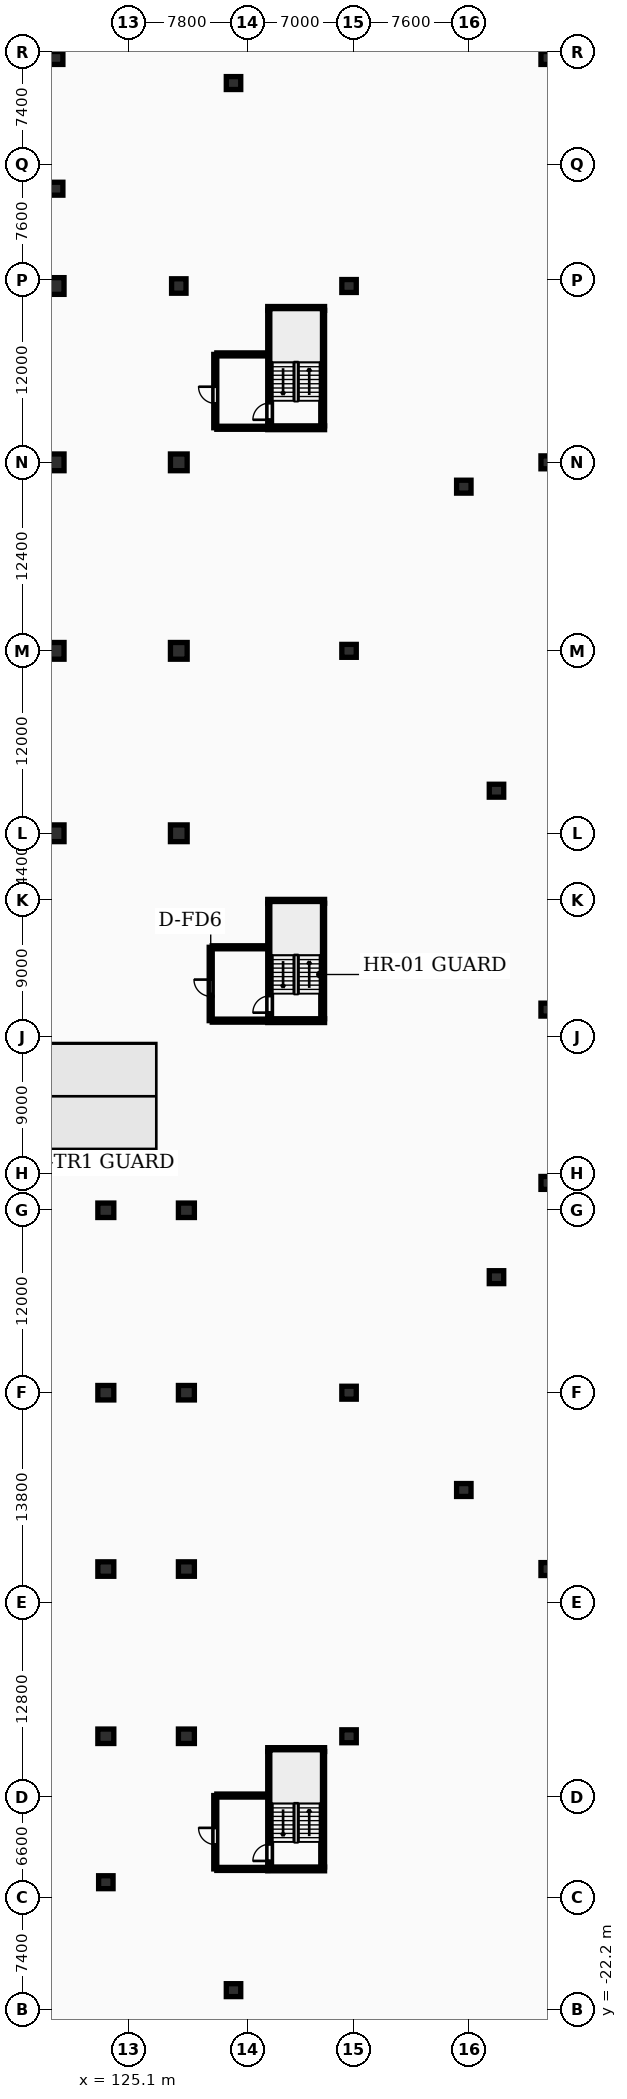
"""IFC4 building model, lengths in metres.
Left out: names, types, materials, properties, quantities, classifications, styles, units other than length and angle.
Written with IfcOpenShell. Run it as: python <this file> out.ifc"""

import sys

from ifc_helpers import new_model, si_unit, direction, frame, frame_2d, origin, origin_2d, place, context, subcontext, project, spatial, rectangle, circle, extrude, element, fill, save


model = new_model("IFC4")
c1 = context("Model", 3, precision=1e-05, world=origin(), true_north=direction((0.0, 1.0)))
c2 = subcontext(c1, "Body", "Model", "MODEL_VIEW")
j1 = project(units=[si_unit("LENGTHUNIT", "METRE"), si_unit("PLANEANGLEUNIT", "RADIAN")], contexts=[c1])
p1 = place(None, origin())
s1 = spatial("IfcSite", under=j1, at=p1, CompositionType="ELEMENT")
p2 = place(p1, origin())
s2 = spatial("IfcBuilding", under=s1, at=p2, CompositionType="ELEMENT")
p3 = place(p2, frame((0.0, 0.0, -10.8)))
s3 = spatial("IfcBuildingStorey", under=s2, at=p3, CompositionType="ELEMENT", Elevation=-10.8)
for number, where, z_axis, x_axis in (
    (1, (120.3, 55.2, -0.45), (0.0, 0.0, 1.0), (1.0, 0.0, 0.0)),
    (2, (120.3, 67.2, -0.45), (0.0, 0.0, 1.0), (1.0, 0.0, 0.0)),
    (3, (120.3, 79.6, -0.45), (0.0, 0.0, 1.0), (1.0, 0.0, 0.0)),
    (4, (120.3, 91.2, -0.45), (0.0, 0.0, 1.0), (1.0, 0.0, 0.0)),
    (5, (128.4, 55.2, -0.45), (0.0, 0.0, 1.0), (1.0, 0.0, 0.0)),
    (6, (128.4, 67.2, -0.45), (0.0, 0.0, 1.0), (1.0, 0.0, 0.0)),
    (7, (128.4, 79.6, -0.45), (0.0, 0.0, 1.0), (1.0, 0.0, 0.0)),
):
    element("IfcColumn", number, at=place(p3, frame(where, z_axis=z_axis, x_axis=x_axis)), inside=s3, PredefinedType="COLUMN", context=c2, shape_type="SweptSolid", body=[
        extrude(rectangle(XDim=1.1, YDim=1.1, at=origin_2d()), origin(), (0.0, 0.0, 1.0), 4.05),
    ])
p4 = place(p3, frame((128.4, 91.2, -0.45), z_axis=(0.0, 0.0, 1.0), x_axis=(1.0, 0.0, 0.0)))
e8 = element("IfcColumn", 8, at=p4, inside=s3, PredefinedType="COLUMN", context=c2, shape_type="SweptSolid", body=[
    extrude(circle(Radius=0.475, at=origin_2d()), origin(), (0.0, 0.0, 1.0), 4.05),
])
for number, where, z_axis, x_axis in (
    (9, (123.6, -4.2, -0.45), (0.0, 0.0, 1.0), (1.0, 0.0, 0.0)),
    (10, (123.6, 6.8, -0.45), (0.0, 0.0, 1.0), (1.0, 0.0, 0.0)),
    (11, (123.6, 18.4, -0.45), (0.0, 0.0, 1.0), (1.0, 0.0, 0.0)),
    (12, (123.6, 30.4, -0.45), (0.0, 0.0, 1.0), (1.0, 0.0, 0.0)),
    (13, (128.9, -4.2, -0.45), (0.0, 0.0, 1.0), (1.0, 0.0, 0.0)),
    (14, (128.9, 6.8, -0.45), (0.0, 0.0, 1.0), (1.0, 0.0, 0.0)),
    (15, (128.9, 18.4, -0.45), (0.0, 0.0, 1.0), (1.0, 0.0, 0.0)),
    (16, (128.9, 30.4, -0.45), (0.0, 0.0, 1.0), (1.0, 0.0, 0.0)),
):
    element("IfcColumn", number, at=place(p3, frame(where, z_axis=z_axis, x_axis=x_axis)), inside=s3, PredefinedType="COLUMN", context=c2, shape_type="SweptSolid", body=[
        extrude(rectangle(XDim=1.05, YDim=0.95, at=origin_2d()), origin(), (0.0, 0.0, 1.0), 4.05),
    ])
for number, where, z_axis, x_axis in (
    (17, (139.6, -4.2, -0.45), (0.0, 0.0, 1.0), (1.0, 0.0, 0.0)),
    (18, (139.6, 18.4, -0.45), (0.0, 0.0, 1.0), (1.0, 0.0, 0.0)),
    (19, (139.6, 67.2, -0.45), (0.0, 0.0, 1.0), (1.0, 0.0, 0.0)),
    (20, (139.6, 91.2, -0.45), (0.0, 0.0, 1.0), (1.0, 0.0, 0.0)),
    (21, (123.6, -13.8, -0.45), (0.0, 0.0, 1.0), (1.0, 0.0, 0.0)),
    (22, (120.3, 97.6, -0.45), (0.0, 0.0, 1.0), (1.0, 0.0, 0.0)),
    (23, (132.0, -20.9, -0.45), (0.0, 0.0, 1.0), (1.0, 0.0, 0.0)),
    (24, (132.0, 104.55, -0.45), (0.0, 0.0, 1.0), (1.0, 0.0, 0.0)),
    (25, (149.3, 26.0, -0.45), (0.0, 0.0, 1.0), (1.0, 0.0, 0.0)),
    (26, (149.3, 58.0, -0.45), (0.0, 0.0, 1.0), (1.0, 0.0, 0.0)),
    (27, (147.15, 12.0, -0.45), (0.0, 0.0, 1.0), (1.0, 0.0, 0.0)),
    (28, (147.15, 78.0, -0.45), (0.0, 0.0, 1.0), (1.0, 0.0, 0.0)),
    (29, (152.7, 6.8, -0.45), (0.0, 0.0, 1.0), (1.0, 0.0, 0.0)),
    (30, (152.7, 32.2, -0.45), (0.0, 0.0, 1.0), (1.0, 0.0, 0.0)),
    (31, (152.7, 43.6, -0.45), (0.0, 0.0, 1.0), (1.0, 0.0, 0.0)),
    (32, (152.7, 79.6, -0.45), (0.0, 0.0, 1.0), (1.0, 0.0, 0.0)),
    (33, (152.7, 106.2, -0.45), (0.0, 0.0, 1.0), (1.0, 0.0, 0.0)),
    (34, (120.3, 106.2, -0.45), (0.0, 0.0, 1.0), (1.0, 0.0, 0.0)),
):
    element("IfcColumn", number, at=place(p3, frame(where, z_axis=z_axis, x_axis=x_axis)), inside=s3, PredefinedType="COLUMN", context=c2, shape_type="SweptSolid", body=[
        extrude(rectangle(XDim=0.95, YDim=0.85, at=origin_2d()), origin(), (0.0, 0.0, 1.0), 4.05),
    ])
p5 = place(p3, frame((134.375, 43.0, 0.0), z_axis=(0.0, 0.0, 1.0), x_axis=(0.0, 1.0, 0.0)))
e35 = element("IfcWall", 35, at=p5, inside=s3, PredefinedType="SHEAR", context=c2, shape_type="SweptSolid", body=[
    extrude(rectangle(XDim=7.6, YDim=0.25, at=frame_2d((3.8, 0.0))), origin(), (0.0, 0.0, 1.0), 3.6),
])
p6 = place(p5, frame((0.4, 0.0, 0.0)))
e36 = element("IfcOpeningElement", 36, at=p6, cuts=e35, PredefinedType="OPENING", context=c2, shape_type="SweptSolid", body=[
    extrude(rectangle(XDim=1.1, YDim=2.1, at=frame_2d((0.55, 1.05))), frame((0.0, 0.135, 0.0), z_axis=(0.0, -1.0, 0.0), x_axis=(1.0, 0.0, 0.0)), (0.0, 0.0, 1.0), 0.27),
])
p7 = place(p3, frame((137.865, 43.0, 0.0), z_axis=(0.0, 0.0, 1.0), x_axis=(0.0, 1.0, 0.0)))
e37 = element("IfcWall", 37, at=p7, inside=s3, PredefinedType="SHEAR", context=c2, shape_type="SweptSolid", body=[
    extrude(rectangle(XDim=7.6, YDim=0.25, at=frame_2d((3.8, 0.0))), origin(), (0.0, 0.0, 1.0), 3.6),
])
for number, where, z_axis, x_axis in (
    (38, (134.25, 42.875, 0.0), (0.0, 0.0, 1.0), (1.0, 0.0, 0.0)),
    (39, (134.25, 50.725, 0.0), (0.0, 0.0, 1.0), (1.0, 0.0, 0.0)),
):
    element("IfcWall", number, at=place(p3, frame(where, z_axis=z_axis, x_axis=x_axis)), inside=s3, PredefinedType="SHEAR", context=c2, shape_type="SweptSolid", body=[
        extrude(rectangle(XDim=3.74, YDim=0.25, at=frame_2d((1.87, 0.0))), origin(), (0.0, 0.0, 1.0), 3.6),
    ])
p8 = place(p3, frame((130.5, 42.875, 0.0), z_axis=(0.0, 0.0, 1.0), x_axis=(0.0, 1.0, 0.0)))
e40 = element("IfcWall", 40, at=p8, inside=s3, PredefinedType="PARTITIONING", context=c2, shape_type="SweptSolid", body=[
    extrude(rectangle(XDim=4.825, YDim=0.2, at=frame_2d((2.413, 0.0))), origin(), (0.0, 0.0, 1.0), 3.3),
])
p9 = place(p8, frame((1.6, 0.0, 0.0)))
e41 = element("IfcOpeningElement", 41, at=p9, cuts=e40, PredefinedType="OPENING", context=c2, shape_type="SweptSolid", body=[
    extrude(rectangle(XDim=1.1, YDim=2.15, at=frame_2d((0.55, 1.075))), frame((0.0, 0.11, 0.0), z_axis=(0.0, -1.0, 0.0), x_axis=(1.0, 0.0, 0.0)), (0.0, 0.0, 1.0), 0.22),
])
for number, where, z_axis, x_axis in (
    (42, (130.6, 42.875, 0.0), (0.0, 0.0, 1.0), (1.0, 0.0, 0.0)),
    (43, (130.6, 47.7, 0.0), (0.0, 0.0, 1.0), (1.0, 0.0, 0.0)),
):
    element("IfcWall", number, at=place(p3, frame(where, z_axis=z_axis, x_axis=x_axis)), inside=s3, PredefinedType="PARTITIONING", context=c2, shape_type="SweptSolid", body=[
        extrude(rectangle(XDim=3.65, YDim=0.2, at=frame_2d((1.825, 0.0))), origin(), (0.0, 0.0, 1.0), 3.3),
    ])
p10 = place(p3, frame((134.375, 82.0, 0.0), z_axis=(0.0, 0.0, 1.0), x_axis=(0.0, 1.0, 0.0)))
e44 = element("IfcWall", 44, at=p10, inside=s3, PredefinedType="SHEAR", context=c2, shape_type="SweptSolid", body=[
    extrude(rectangle(XDim=7.6, YDim=0.25, at=frame_2d((3.8, 0.0))), origin(), (0.0, 0.0, 1.0), 3.6),
])
p11 = place(p10, frame((0.4, 0.0, 0.0)))
e45 = element("IfcOpeningElement", 45, at=p11, cuts=e44, PredefinedType="OPENING", context=c2, shape_type="SweptSolid", body=[
    extrude(rectangle(XDim=1.1, YDim=2.1, at=frame_2d((0.55, 1.05))), frame((0.0, 0.135, 0.0), z_axis=(0.0, -1.0, 0.0), x_axis=(1.0, 0.0, 0.0)), (0.0, 0.0, 1.0), 0.27),
])
p12 = place(p3, frame((137.865, 82.0, 0.0), z_axis=(0.0, 0.0, 1.0), x_axis=(0.0, 1.0, 0.0)))
e46 = element("IfcWall", 46, at=p12, inside=s3, PredefinedType="SHEAR", context=c2, shape_type="SweptSolid", body=[
    extrude(rectangle(XDim=7.6, YDim=0.25, at=frame_2d((3.8, 0.0))), origin(), (0.0, 0.0, 1.0), 3.6),
])
for number, where, z_axis, x_axis in (
    (47, (134.25, 81.875, 0.0), (0.0, 0.0, 1.0), (1.0, 0.0, 0.0)),
    (48, (134.25, 89.725, 0.0), (0.0, 0.0, 1.0), (1.0, 0.0, 0.0)),
):
    element("IfcWall", number, at=place(p3, frame(where, z_axis=z_axis, x_axis=x_axis)), inside=s3, PredefinedType="SHEAR", context=c2, shape_type="SweptSolid", body=[
        extrude(rectangle(XDim=3.74, YDim=0.25, at=frame_2d((1.87, 0.0))), origin(), (0.0, 0.0, 1.0), 3.6),
    ])
p13 = place(p3, frame((130.8, 81.875, 0.0), z_axis=(0.0, 0.0, 1.0), x_axis=(0.0, 1.0, 0.0)))
e49 = element("IfcWall", 49, at=p13, inside=s3, PredefinedType="PARTITIONING", context=c2, shape_type="SweptSolid", body=[
    extrude(rectangle(XDim=4.825, YDim=0.2, at=frame_2d((2.413, 0.0))), origin(), (0.0, 0.0, 1.0), 3.3),
])
p14 = place(p13, frame((1.6, 0.0, 0.0)))
e50 = element("IfcOpeningElement", 50, at=p14, cuts=e49, PredefinedType="OPENING", context=c2, shape_type="SweptSolid", body=[
    extrude(rectangle(XDim=1.1, YDim=2.15, at=frame_2d((0.55, 1.075))), frame((0.0, 0.11, 0.0), z_axis=(0.0, -1.0, 0.0), x_axis=(1.0, 0.0, 0.0)), (0.0, 0.0, 1.0), 0.22),
])
for number, where, z_axis, x_axis in (
    (51, (130.9, 81.875, 0.0), (0.0, 0.0, 1.0), (1.0, 0.0, 0.0)),
    (52, (130.9, 86.7, 0.0), (0.0, 0.0, 1.0), (1.0, 0.0, 0.0)),
):
    element("IfcWall", number, at=place(p3, frame(where, z_axis=z_axis, x_axis=x_axis)), inside=s3, PredefinedType="PARTITIONING", context=c2, shape_type="SweptSolid", body=[
        extrude(rectangle(XDim=3.35, YDim=0.2, at=frame_2d((1.675, 0.0))), origin(), (0.0, 0.0, 1.0), 3.3),
    ])
p15 = place(p3, frame((134.375, -12.8, 0.0), z_axis=(0.0, 0.0, 1.0), x_axis=(0.0, 1.0, 0.0)))
e53 = element("IfcWall", 53, at=p15, inside=s3, PredefinedType="SHEAR", context=c2, shape_type="SweptSolid", body=[
    extrude(rectangle(XDim=7.6, YDim=0.25, at=frame_2d((3.8, 0.0))), origin(), (0.0, 0.0, 1.0), 3.6),
])
p16 = place(p15, frame((0.4, 0.0, 0.0)))
e54 = element("IfcOpeningElement", 54, at=p16, cuts=e53, PredefinedType="OPENING", context=c2, shape_type="SweptSolid", body=[
    extrude(rectangle(XDim=1.1, YDim=2.1, at=frame_2d((0.55, 1.05))), frame((0.0, 0.135, 0.0), z_axis=(0.0, -1.0, 0.0), x_axis=(1.0, 0.0, 0.0)), (0.0, 0.0, 1.0), 0.27),
])
p17 = place(p3, frame((137.865, -12.8, 0.0), z_axis=(0.0, 0.0, 1.0), x_axis=(0.0, 1.0, 0.0)))
e55 = element("IfcWall", 55, at=p17, inside=s3, PredefinedType="SHEAR", context=c2, shape_type="SweptSolid", body=[
    extrude(rectangle(XDim=7.6, YDim=0.25, at=frame_2d((3.8, 0.0))), origin(), (0.0, 0.0, 1.0), 3.6),
])
for number, where, z_axis, x_axis in (
    (56, (134.25, -12.925, 0.0), (0.0, 0.0, 1.0), (1.0, 0.0, 0.0)),
    (57, (134.25, -5.075, 0.0), (0.0, 0.0, 1.0), (1.0, 0.0, 0.0)),
):
    element("IfcWall", number, at=place(p3, frame(where, z_axis=z_axis, x_axis=x_axis)), inside=s3, PredefinedType="SHEAR", context=c2, shape_type="SweptSolid", body=[
        extrude(rectangle(XDim=3.74, YDim=0.25, at=frame_2d((1.87, 0.0))), origin(), (0.0, 0.0, 1.0), 3.6),
    ])
p18 = place(p3, frame((130.8, -12.925, 0.0), z_axis=(0.0, 0.0, 1.0), x_axis=(0.0, 1.0, 0.0)))
e58 = element("IfcWall", 58, at=p18, inside=s3, PredefinedType="PARTITIONING", context=c2, shape_type="SweptSolid", body=[
    extrude(rectangle(XDim=4.825, YDim=0.2, at=frame_2d((2.413, 0.0))), origin(), (0.0, 0.0, 1.0), 3.3),
])
p19 = place(p18, frame((1.6, 0.0, 0.0)))
e59 = element("IfcOpeningElement", 59, at=p19, cuts=e58, PredefinedType="OPENING", context=c2, shape_type="SweptSolid", body=[
    extrude(rectangle(XDim=1.1, YDim=2.15, at=frame_2d((0.55, 1.075))), frame((0.0, 0.11, 0.0), z_axis=(0.0, -1.0, 0.0), x_axis=(1.0, 0.0, 0.0)), (0.0, 0.0, 1.0), 0.22),
])
for number, where, z_axis, x_axis in (
    (60, (130.9, -12.925, 0.0), (0.0, 0.0, 1.0), (1.0, 0.0, 0.0)),
    (61, (130.9, -8.1, 0.0), (0.0, 0.0, 1.0), (1.0, 0.0, 0.0)),
):
    element("IfcWall", number, at=place(p3, frame(where, z_axis=z_axis, x_axis=x_axis)), inside=s3, PredefinedType="PARTITIONING", context=c2, shape_type="SweptSolid", body=[
        extrude(rectangle(XDim=3.35, YDim=0.2, at=frame_2d((1.675, 0.0))), origin(), (0.0, 0.0, 1.0), 3.3),
    ])
p20 = place(p6, origin())
e62 = element("IfcDoor", 62, at=p20, inside=s3, OperationType="SINGLE_SWING_LEFT", PredefinedType="DOOR", context=c2, shape_type="SweptSolid", body=[
    extrude(rectangle(XDim=1.1, YDim=2.1, at=frame_2d((0.55, 1.05))), frame((0.0, 0.025, 0.0), z_axis=(0.0, -1.0, 0.0), x_axis=(1.0, 0.0, 0.0)), (0.0, 0.0, 1.0), 0.05),
])
fill(e36, e62)
p21 = place(p9, origin())
e63 = element("IfcDoor", 63, at=p21, inside=s3, OperationType="SINGLE_SWING_RIGHT", PredefinedType="DOOR", context=c2, shape_type="SweptSolid", body=[
    extrude(rectangle(XDim=1.1, YDim=2.15, at=frame_2d((0.55, 1.075))), frame((0.0, 0.025, 0.0), z_axis=(0.0, -1.0, 0.0), x_axis=(1.0, 0.0, 0.0)), (0.0, 0.0, 1.0), 0.05),
])
fill(e41, e63)
p22 = place(p11, origin())
e64 = element("IfcDoor", 64, at=p22, inside=s3, OperationType="SINGLE_SWING_LEFT", PredefinedType="DOOR", context=c2, shape_type="SweptSolid", body=[
    extrude(rectangle(XDim=1.1, YDim=2.1, at=frame_2d((0.55, 1.05))), frame((0.0, 0.025, 0.0), z_axis=(0.0, -1.0, 0.0), x_axis=(1.0, 0.0, 0.0)), (0.0, 0.0, 1.0), 0.05),
])
fill(e45, e64)
p23 = place(p14, origin())
e65 = element("IfcDoor", 65, at=p23, inside=s3, OperationType="SINGLE_SWING_RIGHT", PredefinedType="DOOR", context=c2, shape_type="SweptSolid", body=[
    extrude(rectangle(XDim=1.1, YDim=2.15, at=frame_2d((0.55, 1.075))), frame((0.0, 0.025, 0.0), z_axis=(0.0, -1.0, 0.0), x_axis=(1.0, 0.0, 0.0)), (0.0, 0.0, 1.0), 0.05),
])
fill(e50, e65)
p24 = place(p16, origin())
e66 = element("IfcDoor", 66, at=p24, inside=s3, OperationType="SINGLE_SWING_LEFT", PredefinedType="DOOR", context=c2, shape_type="SweptSolid", body=[
    extrude(rectangle(XDim=1.1, YDim=2.1, at=frame_2d((0.55, 1.05))), frame((0.0, 0.025, 0.0), z_axis=(0.0, -1.0, 0.0), x_axis=(1.0, 0.0, 0.0)), (0.0, 0.0, 1.0), 0.05),
])
fill(e54, e66)
p25 = place(p19, origin())
e67 = element("IfcDoor", 67, at=p25, inside=s3, OperationType="SINGLE_SWING_RIGHT", PredefinedType="DOOR", context=c2, shape_type="SweptSolid", body=[
    extrude(rectangle(XDim=1.1, YDim=2.15, at=frame_2d((0.55, 1.075))), frame((0.0, 0.025, 0.0), z_axis=(0.0, -1.0, 0.0), x_axis=(1.0, 0.0, 0.0)), (0.0, 0.0, 1.0), 0.05),
])
fill(e59, e67)
save(model, sys.argv[1])
